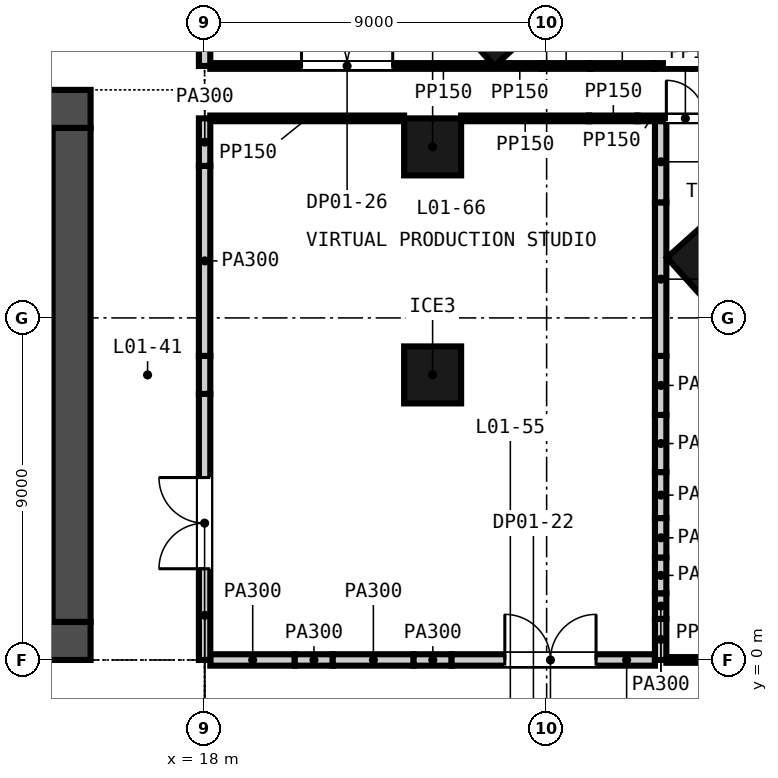
"""IFC4 building model, lengths in metres.
Left out: names, types, materials, properties, quantities, classifications, styles, units other than length and angle.
Written with IfcOpenShell. Run it as: python <this file> out.ifc"""

import sys

from ifc_helpers import new_model, si_unit, direction, frame, frame_2d, origin, origin_2d, place, context, subcontext, project, spatial, rectangle, extrude, element, fill, save


model = new_model("IFC4")
c1 = context("Model", 3, precision=1e-05, world=origin(), true_north=direction((0.0, 1.0)))
c2 = subcontext(c1, "Body", "Model", "MODEL_VIEW")
j1 = project(units=[si_unit("LENGTHUNIT", "METRE"), si_unit("PLANEANGLEUNIT", "RADIAN")], contexts=[c1])
p1 = place(None, origin())
s1 = spatial("IfcSite", under=j1, at=p1, CompositionType="ELEMENT")
p2 = place(p1, origin())
s2 = spatial("IfcBuilding", under=s1, at=p2, CompositionType="ELEMENT")
p3 = place(p2, frame((0.0, 0.0, 9.0)))
s3 = spatial("IfcBuildingStorey", under=s2, at=p3, CompositionType="ELEMENT", Elevation=9.0)
p4 = place(p3, frame((-15.0, 0.5, -0.4), z_axis=(0.0, 0.0, 1.0), x_axis=(1.0, 0.0, 0.0)))
e1 = element("IfcWall", 1, at=p4, inside=s3, PredefinedType="SOLIDWALL", context=c2, shape_type="SweptSolid", body=[
    extrude(rectangle(XDim=30.0, YDim=1.0, at=frame_2d((15.0, 0.0))), origin(), (0.0, 0.0, 1.0), 9.0),
])
p5 = place(p4, frame((5.8, 0.0, 0.4)))
e2 = element("IfcOpeningElement", 2, at=p5, cuts=e1, PredefinedType="OPENING", context=c2, shape_type="SweptSolid", body=[
    extrude(rectangle(XDim=2.4, YDim=2.4, at=frame_2d((1.2, 1.2))), frame((0.0, 0.51, 0.0), z_axis=(0.0, -1.0, 0.0), x_axis=(1.0, 0.0, 0.0)), (0.0, 0.0, 1.0), 1.02),
])
p6 = place(p4, frame((13.8, 0.0, 0.4)))
e3 = element("IfcOpeningElement", 3, at=p6, cuts=e1, PredefinedType="OPENING", context=c2, shape_type="SweptSolid", body=[
    extrude(rectangle(XDim=2.4, YDim=2.4, at=frame_2d((1.2, 1.2))), frame((0.0, 0.51, 0.0), z_axis=(0.0, -1.0, 0.0), x_axis=(1.0, 0.0, 0.0)), (0.0, 0.0, 1.0), 1.02),
])
p7 = place(p4, frame((21.8, 0.0, 0.4)))
e4 = element("IfcOpeningElement", 4, at=p7, cuts=e1, PredefinedType="OPENING", context=c2, shape_type="SweptSolid", body=[
    extrude(rectangle(XDim=2.4, YDim=2.4, at=frame_2d((1.2, 1.2))), frame((0.0, 0.51, 0.0), z_axis=(0.0, -1.0, 0.0), x_axis=(1.0, 0.0, 0.0)), (0.0, 0.0, 1.0), 1.02),
])
p8 = place(p4, frame((1.5, 0.0, 0.4)))
e5 = element("IfcOpeningElement", 5, at=p8, cuts=e1, PredefinedType="OPENING", context=c2, shape_type="SweptSolid", body=[
    extrude(rectangle(XDim=1.2, YDim=2.1, at=frame_2d((0.6, 1.05))), frame((0.0, 0.51, 0.0), z_axis=(0.0, -1.0, 0.0), x_axis=(1.0, 0.0, 0.0)), (0.0, 0.0, 1.0), 1.02),
])
p9 = place(p4, frame((27.3, 0.0, 0.4)))
e6 = element("IfcOpeningElement", 6, at=p9, cuts=e1, PredefinedType="OPENING", context=c2, shape_type="SweptSolid", body=[
    extrude(rectangle(XDim=1.2, YDim=2.1, at=frame_2d((0.6, 1.05))), frame((0.0, 0.51, 0.0), z_axis=(0.0, -1.0, 0.0), x_axis=(1.0, 0.0, 0.0)), (0.0, 0.0, 1.0), 1.02),
])
p10 = place(p3, frame((-15.0, 14.5, -0.4), z_axis=(0.0, 0.0, 1.0), x_axis=(1.0, 0.0, 0.0)))
e7 = element("IfcWall", 7, at=p10, inside=s3, PredefinedType="SOLIDWALL", context=c2, shape_type="SweptSolid", body=[
    extrude(rectangle(XDim=30.0, YDim=1.0, at=frame_2d((15.0, 0.0))), origin(), (0.0, 0.0, 1.0), 9.0),
])
p11 = place(p10, frame((9.25, 0.0, 0.4)))
e8 = element("IfcOpeningElement", 8, at=p11, cuts=e7, PredefinedType="OPENING", context=c2, shape_type="SweptSolid", body=[
    extrude(rectangle(XDim=1.5, YDim=2.1, at=frame_2d((0.75, 1.05))), frame((0.0, 0.51, 0.0), z_axis=(0.0, -1.0, 0.0), x_axis=(1.0, 0.0, 0.0)), (0.0, 0.0, 1.0), 1.02),
])
p12 = place(p10, frame((19.4, 0.0, 0.4)))
e9 = element("IfcOpeningElement", 9, at=p12, cuts=e7, PredefinedType="OPENING", context=c2, shape_type="SweptSolid", body=[
    extrude(rectangle(XDim=1.5, YDim=2.1, at=frame_2d((0.75, 1.05))), frame((0.0, 0.51, 0.0), z_axis=(0.0, -1.0, 0.0), x_axis=(1.0, 0.0, 0.0)), (0.0, 0.0, 1.0), 1.02),
])
p13 = place(p10, frame((1.5, 0.0, 0.4)))
e10 = element("IfcOpeningElement", 10, at=p13, cuts=e7, PredefinedType="OPENING", context=c2, shape_type="SweptSolid", body=[
    extrude(rectangle(XDim=1.2, YDim=2.1, at=frame_2d((0.6, 1.05))), frame((0.0, 0.51, 0.0), z_axis=(0.0, -1.0, 0.0), x_axis=(1.0, 0.0, 0.0)), (0.0, 0.0, 1.0), 1.02),
])
p14 = place(p10, frame((27.3, 0.0, 0.4)))
e11 = element("IfcOpeningElement", 11, at=p14, cuts=e7, PredefinedType="OPENING", context=c2, shape_type="SweptSolid", body=[
    extrude(rectangle(XDim=1.2, YDim=2.1, at=frame_2d((0.6, 1.05))), frame((0.0, 0.51, 0.0), z_axis=(0.0, -1.0, 0.0), x_axis=(1.0, 0.0, 0.0)), (0.0, 0.0, 1.0), 1.02),
])
p15 = place(p3, frame((14.5, 1.0, -0.4), z_axis=(0.0, 0.0, 1.0), x_axis=(0.0, 1.0, 0.0)))
e12 = element("IfcWall", 12, at=p15, inside=s3, PredefinedType="SOLIDWALL", context=c2, shape_type="SweptSolid", body=[
    extrude(rectangle(XDim=13.0, YDim=1.0, at=frame_2d((6.5, 0.0))), origin(), (0.0, 0.0, 1.0), 9.0),
])
for number, where, z_axis, x_axis in (
    (13, (31.438, 10.517, -0.4), (0.0, 0.0, 1.0), (-0.669, 0.743, 0.0)),
    (14, (25.691, 16.9, -0.4), (0.0, 0.0, 1.0), (-0.669, 0.743, 0.0)),
):
    element("IfcColumn", number, at=place(p3, frame(where, z_axis=z_axis, x_axis=x_axis)), inside=s3, PredefinedType="COLUMN", context=c2, shape_type="SweptSolid", body=[
        extrude(rectangle(XDim=1.8, YDim=1.8, at=origin_2d()), origin(), (0.0, 0.0, 1.0), 9.0),
    ])
for number, where, z_axis, x_axis in (
    (15, (24.0, 7.5, -0.4), (0.0, 0.0, 1.0), (1.0, 0.0, 0.0)),
    (16, (24.0, 13.5, -0.4), (0.0, 0.0, 1.0), (1.0, 0.0, 0.0)),
):
    element("IfcColumn", number, at=place(p3, frame(where, z_axis=z_axis, x_axis=x_axis)), inside=s3, PredefinedType="COLUMN", context=c2, shape_type="SweptSolid", body=[
        extrude(rectangle(XDim=1.5, YDim=1.5, at=origin_2d()), origin(), (0.0, 0.0, 1.0), 9.0),
    ])
p16 = place(p3, frame((11.05, 7.35, -0.4), z_axis=(0.0, 0.0, 1.0), x_axis=(1.0, 0.0, 0.0)))
e17 = element("IfcWall", 17, at=p16, inside=s3, PredefinedType="SOLIDWALL", context=c2, shape_type="SweptSolid", body=[
    extrude(rectangle(XDim=2.95, YDim=0.3, at=frame_2d((1.475, 0.0))), origin(), (0.0, 0.0, 1.0), 9.0),
])
p17 = place(p3, frame((18.15, 0.0, 0.0), z_axis=(0.0, 0.0, 1.0), x_axis=(1.0, 0.0, 0.0)))
e18 = element("IfcWall", 18, at=p17, inside=s3, PredefinedType="PARTITIONING", context=c2, shape_type="SweptSolid", body=[
    extrude(rectangle(XDim=2.222, YDim=0.3, at=frame_2d((1.111, 0.0))), origin(), (0.0, 0.0, 1.0), 8.6),
])
p18 = place(p3, frame((20.372, 0.0, 0.0), z_axis=(0.0, 0.0, 1.0), x_axis=(1.0, 0.0, 0.0)))
e19 = element("IfcWall", 19, at=p18, inside=s3, PredefinedType="PARTITIONING", context=c2, shape_type="SweptSolid", body=[
    extrude(rectangle(XDim=1.0, YDim=0.3, at=frame_2d((0.5, 0.0))), origin(), (0.0, 0.0, 1.0), 7.765),
])
p19 = place(p3, frame((21.372, 0.0, 0.0), z_axis=(0.0, 0.0, 1.0), x_axis=(1.0, 0.0, 0.0)))
e20 = element("IfcWall", 20, at=p19, inside=s3, PredefinedType="PARTITIONING", context=c2, shape_type="SweptSolid", body=[
    extrude(rectangle(XDim=2.128, YDim=0.3, at=frame_2d((1.064, 0.0))), origin(), (0.0, 0.0, 1.0), 8.6),
])
p20 = place(p3, frame((23.5, 0.0, 0.0), z_axis=(0.0, 0.0, 1.0), x_axis=(1.0, 0.0, 0.0)))
e21 = element("IfcWall", 21, at=p20, inside=s3, PredefinedType="PARTITIONING", context=c2, shape_type="SweptSolid", body=[
    extrude(rectangle(XDim=1.0, YDim=0.3, at=frame_2d((0.5, 0.0))), origin(), (0.0, 0.0, 1.0), 7.765),
])
p21 = place(p3, frame((24.5, 0.0, 0.0), z_axis=(0.0, 0.0, 1.0), x_axis=(1.0, 0.0, 0.0)))
e22 = element("IfcWall", 22, at=p21, inside=s3, PredefinedType="PARTITIONING", context=c2, shape_type="SweptSolid", body=[
    extrude(rectangle(XDim=5.35, YDim=0.3, at=frame_2d((2.675, 0.0))), origin(), (0.0, 0.0, 1.0), 8.6),
])
p22 = place(p21, frame((1.4, 0.0, 0.0)))
e23 = element("IfcOpeningElement", 23, at=p22, cuts=e22, PredefinedType="OPENING", context=c2, shape_type="SweptSolid", body=[
    extrude(rectangle(XDim=2.4, YDim=2.4, at=frame_2d((1.2, 1.2))), frame((0.0, 0.16, 0.0), z_axis=(0.0, -1.0, 0.0), x_axis=(1.0, 0.0, 0.0)), (0.0, 0.0, 1.0), 0.32),
])
p23 = place(p3, frame((30.15, 0.0, 0.0), z_axis=(0.0, 0.0, 1.0), x_axis=(1.0, 0.0, 0.0)))
e24 = element("IfcWall", 24, at=p23, inside=s3, PredefinedType="PARTITIONING", context=c2, shape_type="SweptSolid", body=[
    extrude(rectangle(XDim=2.021, YDim=0.15, at=frame_2d((1.01, 0.0))), origin(), (0.0, 0.0, 1.0), 8.6),
])
p24 = place(p3, frame((18.15, 14.25, 0.0), z_axis=(0.0, 0.0, 1.0), x_axis=(1.0, 0.0, 0.0)))
e25 = element("IfcWall", 25, at=p24, inside=s3, PredefinedType="PARTITIONING", context=c2, shape_type="SweptSolid", body=[
    extrude(rectangle(XDim=5.1, YDim=0.15, at=frame_2d((2.55, 0.0))), origin(), (0.0, 0.0, 1.0), 8.6),
])
p25 = place(p3, frame((24.75, 14.25, 0.0), z_axis=(0.0, 0.0, 1.0), x_axis=(1.0, 0.0, 0.0)))
e26 = element("IfcWall", 26, at=p25, inside=s3, PredefinedType="PARTITIONING", context=c2, shape_type="SweptSolid", body=[
    extrude(rectangle(XDim=3.361, YDim=0.15, at=frame_2d((1.681, 0.0))), origin(), (0.0, 0.0, 1.0), 8.6),
])
p26 = place(p3, frame((28.111, 14.25, 0.0), z_axis=(0.0, 0.0, 1.0), x_axis=(1.0, 0.0, 0.0)))
e27 = element("IfcWall", 27, at=p26, inside=s3, PredefinedType="PARTITIONING", context=c2, shape_type="SweptSolid", body=[
    extrude(rectangle(XDim=1.278, YDim=0.15, at=frame_2d((0.639, 0.0))), origin(), (0.0, 0.0, 1.0), 7.6),
])
p27 = place(p3, frame((29.389, 14.25, 0.0), z_axis=(0.0, 0.0, 1.0), x_axis=(1.0, 0.0, 0.0)))
e28 = element("IfcWall", 28, at=p27, inside=s3, PredefinedType="PARTITIONING", context=c2, shape_type="SweptSolid", body=[
    extrude(rectangle(XDim=1.929, YDim=0.15, at=frame_2d((0.965, 0.0))), origin(), (0.0, 0.0, 1.0), 7.511),
])
p28 = place(p27, frame((0.76, 0.0, 0.0)))
e29 = element("IfcOpeningElement", 29, at=p28, cuts=e28, PredefinedType="OPENING", context=c2, shape_type="SweptSolid", body=[
    extrude(rectangle(XDim=1.0, YDim=2.1, at=frame_2d((0.5, 1.05))), frame((0.0, 0.085, 0.0), z_axis=(0.0, -1.0, 0.0), x_axis=(1.0, 0.0, 0.0)), (0.0, 0.0, 1.0), 0.17),
])
p29 = place(p3, frame((18.15, 15.629, 0.0), z_axis=(0.0, 0.0, 1.0), x_axis=(1.0, 0.0, 0.0)))
e30 = element("IfcWall", 30, at=p29, inside=s3, PredefinedType="PARTITIONING", context=c2, shape_type="SweptSolid", body=[
    extrude(rectangle(XDim=7.407, YDim=0.15, at=frame_2d((3.704, 0.0))), origin(), (0.0, 0.0, 1.0), 8.6),
])
p30 = place(p29, frame((2.4, 0.0, 0.0)))
e31 = element("IfcOpeningElement", 31, at=p30, cuts=e30, PredefinedType="OPENING", context=c2, shape_type="SweptSolid", body=[
    extrude(rectangle(XDim=2.4, YDim=2.4, at=frame_2d((1.2, 1.2))), frame((0.0, 0.085, 0.0), z_axis=(0.0, -1.0, 0.0), x_axis=(1.0, 0.0, 0.0)), (0.0, 0.0, 1.0), 0.17),
])
p31 = place(p3, frame((25.708, 15.629, 0.0), z_axis=(0.0, 0.0, 1.0), x_axis=(1.0, 0.0, 0.0)))
e32 = element("IfcWall", 32, at=p31, inside=s3, PredefinedType="PARTITIONING", context=c2, shape_type="SweptSolid", body=[
    extrude(rectangle(XDim=1.162, YDim=0.15, at=frame_2d((0.581, 0.0))), origin(), (0.0, 0.0, 1.0), 8.6),
])
p32 = place(p3, frame((26.869, 15.629, 0.0), z_axis=(0.0, 0.0, 1.0), x_axis=(1.0, 0.0, 0.0)))
e33 = element("IfcWall", 33, at=p32, inside=s3, PredefinedType="PARTITIONING", context=c2, shape_type="SweptSolid", body=[
    extrude(rectangle(XDim=1.278, YDim=0.15, at=frame_2d((0.639, 0.0))), origin(), (0.0, 0.0, 1.0), 7.6),
])
p33 = place(p3, frame((28.148, 15.629, 0.0), z_axis=(0.0, 0.0, 1.0), x_axis=(1.0, 0.0, 0.0)))
e34 = element("IfcWall", 34, at=p33, inside=s3, PredefinedType="PARTITIONING", context=c2, shape_type="SweptSolid", body=[
    extrude(rectangle(XDim=1.676, YDim=0.15, at=frame_2d((0.838, 0.0))), origin(), (0.0, 0.0, 1.0), 8.6),
])
p34 = place(p3, frame((29.823, 15.629, 0.0), z_axis=(0.0, 0.0, 1.0), x_axis=(1.0, 0.0, 0.0)))
e35 = element("IfcWall", 35, at=p34, inside=s3, PredefinedType="PARTITIONING", context=c2, shape_type="SweptSolid", body=[
    extrude(rectangle(XDim=1.0, YDim=0.15, at=frame_2d((0.5, 0.0))), origin(), (0.0, 0.0, 1.0), 7.511),
])
p35 = place(p3, frame((30.823, 15.629, 0.0), z_axis=(0.0, 0.0, 1.0), x_axis=(1.0, 0.0, 0.0)))
e36 = element("IfcWall", 36, at=p35, inside=s3, PredefinedType="PARTITIONING", context=c2, shape_type="SweptSolid", body=[
    extrude(rectangle(XDim=1.523, YDim=0.15, at=frame_2d((0.762, 0.0))), origin(), (0.0, 0.0, 1.0), 8.6),
])
p36 = place(p3, frame((18.0, 0.0, 0.0), z_axis=(0.0, 0.0, 1.0), x_axis=(0.0, 1.0, 0.0)))
e37 = element("IfcWall", 37, at=p36, inside=s3, PredefinedType="PARTITIONING", context=c2, shape_type="SweptSolid", body=[
    extrude(rectangle(XDim=7.0, YDim=0.3, at=frame_2d((3.5, 0.0))), origin(), (0.0, 0.0, 1.0), 8.6),
])
p37 = place(p36, frame((2.4, 0.0, 0.0)))
e38 = element("IfcOpeningElement", 38, at=p37, cuts=e37, PredefinedType="OPENING", context=c2, shape_type="SweptSolid", body=[
    extrude(rectangle(XDim=2.4, YDim=2.4, at=frame_2d((1.2, 1.2))), frame((0.0, 0.16, 0.0), z_axis=(0.0, -1.0, 0.0), x_axis=(1.0, 0.0, 0.0)), (0.0, 0.0, 1.0), 0.32),
])
p38 = place(p3, frame((18.0, 7.0, 0.0), z_axis=(0.0, 0.0, 1.0), x_axis=(0.0, 1.0, 0.0)))
e39 = element("IfcWall", 39, at=p38, inside=s3, PredefinedType="PARTITIONING", context=c2, shape_type="SweptSolid", body=[
    extrude(rectangle(XDim=1.0, YDim=0.3, at=frame_2d((0.5, 0.0))), origin(), (0.0, 0.0, 1.0), 7.994),
])
p39 = place(p3, frame((18.0, 8.0, 0.0), z_axis=(0.0, 0.0, 1.0), x_axis=(0.0, 1.0, 0.0)))
e40 = element("IfcWall", 40, at=p39, inside=s3, PredefinedType="PARTITIONING", context=c2, shape_type="SweptSolid", body=[
    extrude(rectangle(XDim=5.0, YDim=0.3, at=frame_2d((2.5, 0.0))), origin(), (0.0, 0.0, 1.0), 8.6),
])
p40 = place(p3, frame((18.0, 13.0, 0.0), z_axis=(0.0, 0.0, 1.0), x_axis=(0.0, 1.0, 0.0)))
e41 = element("IfcWall", 41, at=p40, inside=s3, PredefinedType="PARTITIONING", context=c2, shape_type="SweptSolid", body=[
    extrude(rectangle(XDim=1.25, YDim=0.3, at=frame_2d((0.625, 0.0))), origin(), (0.0, 0.0, 1.0), 7.994),
])
p41 = place(p3, frame((18.0, 15.629, 0.0), z_axis=(0.0, 0.0, 1.0), x_axis=(0.0, 1.0, 0.0)))
e42 = element("IfcWall", 42, at=p41, inside=s3, PredefinedType="PARTITIONING", context=c2, shape_type="SweptSolid", body=[
    extrude(rectangle(XDim=4.178, YDim=0.3, at=frame_2d((2.089, 0.0))), origin(), (0.0, 0.0, 1.0), 8.6),
])
p42 = place(p41, frame((2.771, 0.0, 0.0)))
e43 = element("IfcOpeningElement", 43, at=p42, cuts=e42, PredefinedType="OPENING", context=c2, shape_type="SweptSolid", body=[
    extrude(rectangle(XDim=1.0, YDim=2.1, at=frame_2d((0.5, 1.05))), frame((0.0, 0.16, 0.0), z_axis=(0.0, -1.0, 0.0), x_axis=(1.0, 0.0, 0.0)), (0.0, 0.0, 1.0), 0.32),
])
p43 = place(p3, frame((30.0, 0.0, 0.0), z_axis=(0.0, 0.0, 1.0), x_axis=(0.0, 1.0, 0.0)))
e44 = element("IfcWall", 44, at=p43, inside=s3, PredefinedType="PARTITIONING", context=c2, shape_type="SweptSolid", body=[
    extrude(rectangle(XDim=1.08, YDim=0.3, at=frame_2d((0.54, 0.0))), origin(), (0.0, 0.0, 1.0), 7.921),
])
p44 = place(p3, frame((30.0, 1.08, 0.0), z_axis=(0.0, 0.0, 1.0), x_axis=(0.0, 1.0, 0.0)))
e45 = element("IfcWall", 45, at=p44, inside=s3, PredefinedType="PARTITIONING", context=c2, shape_type="SweptSolid", body=[
    extrude(rectangle(XDim=0.674, YDim=0.3, at=frame_2d((0.337, 0.0))), origin(), (0.0, 0.0, 1.0), 7.921),
])
p45 = place(p3, frame((30.0, 1.755, 0.0), z_axis=(0.0, 0.0, 1.0), x_axis=(0.0, 1.0, 0.0)))
e46 = element("IfcWall", 46, at=p45, inside=s3, PredefinedType="PARTITIONING", context=c2, shape_type="SweptSolid", body=[
    extrude(rectangle(XDim=0.941, YDim=0.3, at=frame_2d((0.47, 0.0))), origin(), (0.0, 0.0, 1.0), 7.851),
])
p46 = place(p3, frame((30.0, 2.696, 0.0), z_axis=(0.0, 0.0, 1.0), x_axis=(0.0, 1.0, 0.0)))
e47 = element("IfcWall", 47, at=p46, inside=s3, PredefinedType="PARTITIONING", context=c2, shape_type="SweptSolid", body=[
    extrude(rectangle(XDim=1.038, YDim=0.3, at=frame_2d((0.519, 0.0))), origin(), (0.0, 0.0, 1.0), 7.851),
])
p47 = place(p3, frame((30.0, 3.733, 0.0), z_axis=(0.0, 0.0, 1.0), x_axis=(0.0, 1.0, 0.0)))
e48 = element("IfcWall", 48, at=p47, inside=s3, PredefinedType="PARTITIONING", context=c2, shape_type="SweptSolid", body=[
    extrude(rectangle(XDim=1.209, YDim=0.3, at=frame_2d((0.605, 0.0))), origin(), (0.0, 0.0, 1.0), 7.851),
])
p48 = place(p3, frame((30.0, 4.943, 0.0), z_axis=(0.0, 0.0, 1.0), x_axis=(0.0, 1.0, 0.0)))
e49 = element("IfcWall", 49, at=p48, inside=s3, PredefinedType="PARTITIONING", context=c2, shape_type="SweptSolid", body=[
    extrude(rectangle(XDim=1.504, YDim=0.3, at=frame_2d((0.752, 0.0))), origin(), (0.0, 0.0, 1.0), 7.921),
])
p49 = place(p3, frame((30.0, 6.447, 0.0), z_axis=(0.0, 0.0, 1.0), x_axis=(0.0, 1.0, 0.0)))
e50 = element("IfcWall", 50, at=p49, inside=s3, PredefinedType="PARTITIONING", context=c2, shape_type="SweptSolid", body=[
    extrude(rectangle(XDim=1.553, YDim=0.3, at=frame_2d((0.776, 0.0))), origin(), (0.0, 0.0, 1.0), 7.994),
])
p50 = place(p3, frame((30.0, 8.0, 0.0), z_axis=(0.0, 0.0, 1.0), x_axis=(0.0, 1.0, 0.0)))
e51 = element("IfcWall", 51, at=p50, inside=s3, PredefinedType="PARTITIONING", context=c2, shape_type="SweptSolid", body=[
    extrude(rectangle(XDim=4.04, YDim=0.3, at=frame_2d((2.02, 0.0))), origin(), (0.0, 0.0, 1.0), 8.6),
])
p51 = place(p3, frame((30.0, 12.04, 0.0), z_axis=(0.0, 0.0, 1.0), x_axis=(0.0, 1.0, 0.0)))
e52 = element("IfcWall", 52, at=p51, inside=s3, PredefinedType="PARTITIONING", context=c2, shape_type="SweptSolid", body=[
    extrude(rectangle(XDim=2.135, YDim=0.3, at=frame_2d((1.067, 0.0))), origin(), (0.0, 0.0, 1.0), 7.6),
])
p52 = place(p30, origin())
e53 = element("IfcDoor", 53, at=p52, inside=s3, OperationType="SINGLE_SWING_LEFT", PredefinedType="DOOR", context=c2, shape_type="SweptSolid", body=[
    extrude(rectangle(XDim=2.4, YDim=2.4, at=frame_2d((1.2, 1.2))), frame((0.0, 0.025, 0.0), z_axis=(0.0, -1.0, 0.0), x_axis=(1.0, 0.0, 0.0)), (0.0, 0.0, 1.0), 0.05),
])
fill(e31, e53)
p53 = place(p37, origin())
e54 = element("IfcDoor", 54, at=p53, inside=s3, OperationType="SINGLE_SWING_LEFT", PredefinedType="DOOR", context=c2, shape_type="SweptSolid", body=[
    extrude(rectangle(XDim=2.4, YDim=2.4, at=frame_2d((1.2, 1.2))), frame((0.0, 0.025, 0.0), z_axis=(0.0, -1.0, 0.0), x_axis=(1.0, 0.0, 0.0)), (0.0, 0.0, 1.0), 0.05),
])
fill(e38, e54)
p54 = place(p22, origin())
e55 = element("IfcDoor", 55, at=p54, inside=s3, OperationType="SINGLE_SWING_LEFT", PredefinedType="DOOR", context=c2, shape_type="SweptSolid", body=[
    extrude(rectangle(XDim=2.4, YDim=2.4, at=frame_2d((1.2, 1.2))), frame((0.0, 0.025, 0.0), z_axis=(0.0, -1.0, 0.0), x_axis=(1.0, 0.0, 0.0)), (0.0, 0.0, 1.0), 0.05),
])
fill(e23, e55)
p55 = place(p28, origin())
e56 = element("IfcDoor", 56, at=p55, inside=s3, OperationType="SINGLE_SWING_LEFT", PredefinedType="DOOR", context=c2, shape_type="SweptSolid", body=[
    extrude(rectangle(XDim=1.0, YDim=2.1, at=frame_2d((0.5, 1.05))), frame((0.0, 0.025, 0.0), z_axis=(0.0, -1.0, 0.0), x_axis=(1.0, 0.0, 0.0)), (0.0, 0.0, 1.0), 0.05),
])
fill(e29, e56)
save(model, sys.argv[1])
